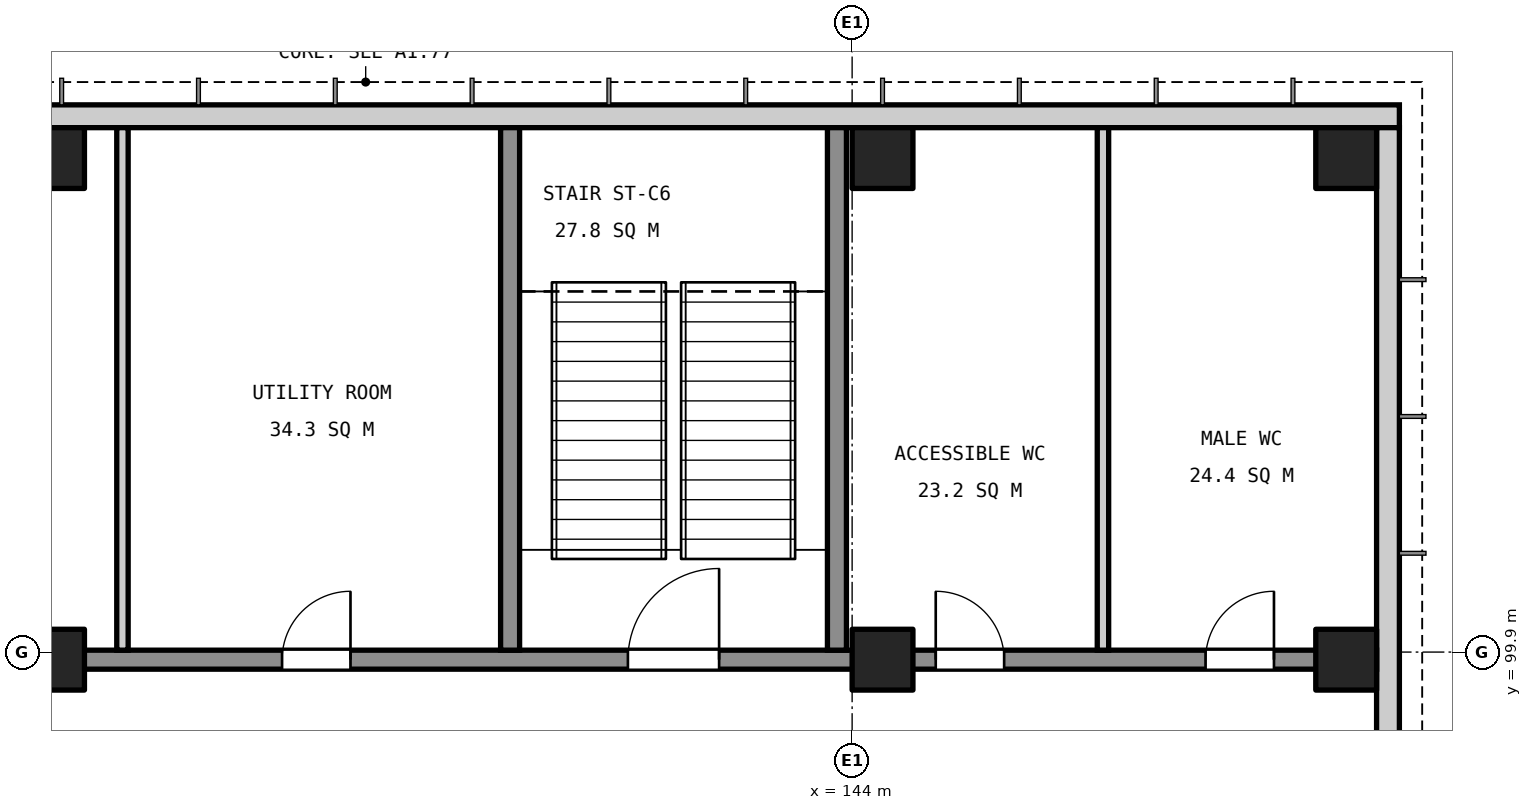
"""IFC4 building model, lengths in metres.
Left out: names, types, materials, properties, quantities, classifications, styles, units other than length and angle.
Written with IfcOpenShell. Run it as: python <this file> out.ifc"""

import sys

from ifc_helpers import new_model, si_unit, direction, frame, frame_2d, origin, origin_2d, place, context, subcontext, project, spatial, rectangle, extrude, element, fill, save


model = new_model("IFC4")
c1 = context("Model", 3, precision=1e-05, world=origin(), true_north=direction((0.0, 1.0)))
c2 = subcontext(c1, "Body", "Model", "MODEL_VIEW")
j1 = project(units=[si_unit("LENGTHUNIT", "METRE"), si_unit("PLANEANGLEUNIT", "RADIAN")], contexts=[c1])
p1 = place(None, origin())
s1 = spatial("IfcSite", under=j1, at=p1, CompositionType="ELEMENT")
p2 = place(p1, origin())
s2 = spatial("IfcBuilding", under=s1, at=p2, CompositionType="ELEMENT")
p3 = place(p2, frame((0.0, 0.0, 6.0)))
s3 = spatial("IfcBuildingStorey", under=s2, at=p3, CompositionType="ELEMENT", Elevation=6.0)
for number, where, z_axis, x_axis in (
    (1, (133.5, 99.8, 0.0), (0.0, 0.0, 1.0), (1.0, 0.0, 0.0)),
    (2, (133.5, 106.4, 0.0), (0.0, 0.0, 1.0), (1.0, 0.0, 0.0)),
    (3, (144.4, 99.8, 0.0), (0.0, 0.0, 1.0), (1.0, 0.0, 0.0)),
    (4, (144.4, 106.4, 0.0), (0.0, 0.0, 1.0), (1.0, 0.0, 0.0)),
    (5, (150.5, 99.8, 0.0), (0.0, 0.0, 1.0), (1.0, 0.0, 0.0)),
    (6, (150.5, 106.4, 0.0), (0.0, 0.0, 1.0), (1.0, 0.0, 0.0)),
):
    element("IfcColumn", number, at=place(p3, frame(where, z_axis=z_axis, x_axis=x_axis)), inside=s3, PredefinedType="COLUMN", context=c2, shape_type="SweptSolid", body=[
        extrude(rectangle(XDim=0.8, YDim=0.8, at=origin_2d()), origin(), (0.0, 0.0, 1.0), 5.4),
    ])
p4 = place(p3, frame((124.0, 106.95, 0.0), z_axis=(0.0, 0.0, 1.0), x_axis=(1.0, 0.0, 0.0)))
e7 = element("IfcWall", 7, at=p4, inside=s3, PredefinedType="SOLIDWALL", context=c2, shape_type="SweptSolid", body=[
    extrude(rectangle(XDim=27.2, YDim=0.3, at=frame_2d((13.6, 0.0))), origin(), (0.0, 0.0, 1.0), 4.95),
])
p5 = place(p3, frame((151.05, 70.3, 0.0), z_axis=(0.0, 0.0, 1.0), x_axis=(0.0, 1.0, 0.0)))
e8 = element("IfcWall", 8, at=p5, inside=s3, PredefinedType="SOLIDWALL", context=c2, shape_type="SweptSolid", body=[
    extrude(rectangle(XDim=36.5, YDim=0.3, at=frame_2d((18.25, 0.0))), origin(), (0.0, 0.0, 1.0), 4.95),
])
p6 = place(p3, frame((124.3, 99.8, 0.0), z_axis=(0.0, 0.0, 1.0), x_axis=(1.0, 0.0, 0.0)))
e9 = element("IfcWall", 9, at=p6, inside=s3, PredefinedType="SOLIDWALL", context=c2, shape_type="SweptSolid", body=[
    extrude(rectangle(XDim=26.6, YDim=0.25, at=frame_2d((13.3, 0.0))), origin(), (0.0, 0.0, 1.0), 4.95),
])
p7 = place(p6, frame((0.9, 0.0, 0.0)))
e10 = element("IfcOpeningElement", 10, at=p7, cuts=e9, PredefinedType="OPENING", context=c2, shape_type="SweptSolid", body=[
    extrude(rectangle(XDim=1.2, YDim=2.1, at=frame_2d((0.6, 1.05))), frame((0.0, 0.135, 0.0), z_axis=(0.0, -1.0, 0.0), x_axis=(1.0, 0.0, 0.0)), (0.0, 0.0, 1.0), 0.27),
])
p8 = place(p6, frame((3.9, 0.0, 0.0)))
e11 = element("IfcOpeningElement", 11, at=p8, cuts=e9, PredefinedType="OPENING", context=c2, shape_type="SweptSolid", body=[
    extrude(rectangle(XDim=1.2, YDim=2.1, at=frame_2d((0.6, 1.05))), frame((0.0, 0.135, 0.0), z_axis=(0.0, -1.0, 0.0), x_axis=(1.0, 0.0, 0.0)), (0.0, 0.0, 1.0), 0.27),
])
p9 = place(p6, frame((7.6, 0.0, 0.0)))
e12 = element("IfcOpeningElement", 12, at=p9, cuts=e9, PredefinedType="OPENING", context=c2, shape_type="SweptSolid", body=[
    extrude(rectangle(XDim=0.9, YDim=2.1, at=frame_2d((0.45, 1.05))), frame((0.0, 0.135, 0.0), z_axis=(0.0, -1.0, 0.0), x_axis=(1.0, 0.0, 0.0)), (0.0, 0.0, 1.0), 0.27),
])
p10 = place(p6, frame((20.8, 0.0, 0.0)))
e13 = element("IfcOpeningElement", 13, at=p10, cuts=e9, PredefinedType="OPENING", context=c2, shape_type="SweptSolid", body=[
    extrude(rectangle(XDim=0.9, YDim=2.1, at=frame_2d((0.45, 1.05))), frame((0.0, 0.135, 0.0), z_axis=(0.0, -1.0, 0.0), x_axis=(1.0, 0.0, 0.0)), (0.0, 0.0, 1.0), 0.27),
])
p11 = place(p6, frame((24.35, 0.0, 0.0)))
e14 = element("IfcOpeningElement", 14, at=p11, cuts=e9, PredefinedType="OPENING", context=c2, shape_type="SweptSolid", body=[
    extrude(rectangle(XDim=0.9, YDim=2.1, at=frame_2d((0.45, 1.05))), frame((0.0, 0.135, 0.0), z_axis=(0.0, -1.0, 0.0), x_axis=(1.0, 0.0, 0.0)), (0.0, 0.0, 1.0), 0.27),
])
p12 = place(p6, frame((12.2, 0.0, 0.0)))
e15 = element("IfcOpeningElement", 15, at=p12, cuts=e9, PredefinedType="OPENING", context=c2, shape_type="SweptSolid", body=[
    extrude(rectangle(XDim=0.9, YDim=2.1, at=frame_2d((0.45, 1.05))), frame((0.0, 0.135, 0.0), z_axis=(0.0, -1.0, 0.0), x_axis=(1.0, 0.0, 0.0)), (0.0, 0.0, 1.0), 0.27),
])
p13 = place(p6, frame((16.75, 0.0, 0.0)))
e16 = element("IfcOpeningElement", 16, at=p13, cuts=e9, PredefinedType="OPENING", context=c2, shape_type="SweptSolid", body=[
    extrude(rectangle(XDim=1.2, YDim=2.1, at=frame_2d((0.6, 1.05))), frame((0.0, 0.135, 0.0), z_axis=(0.0, -1.0, 0.0), x_axis=(1.0, 0.0, 0.0)), (0.0, 0.0, 1.0), 0.27),
])
p14 = place(p3, frame((134.4, 99.925, 0.0), z_axis=(0.0, 0.0, 1.0), x_axis=(0.0, 1.0, 0.0)))
e17 = element("IfcWall", 17, at=p14, inside=s3, PredefinedType="SOLIDWALL", context=c2, shape_type="SweptSolid", body=[
    extrude(rectangle(XDim=6.875, YDim=0.15, at=frame_2d((3.438, 0.0))), origin(), (0.0, 0.0, 1.0), 4.95),
])
for number, where, z_axis, x_axis in (
    (18, (139.5, 99.925, 0.0), (0.0, 0.0, 1.0), (0.0, 1.0, 0.0)),
    (19, (143.8, 99.925, 0.0), (0.0, 0.0, 1.0), (0.0, 1.0, 0.0)),
):
    element("IfcWall", number, at=place(p3, frame(where, z_axis=z_axis, x_axis=x_axis)), inside=s3, PredefinedType="SOLIDWALL", context=c2, shape_type="SweptSolid", body=[
        extrude(rectangle(XDim=6.875, YDim=0.25, at=frame_2d((3.438, 0.0))), origin(), (0.0, 0.0, 1.0), 4.95),
    ])
p15 = place(p3, frame((147.3, 99.925, 0.0), z_axis=(0.0, 0.0, 1.0), x_axis=(0.0, 1.0, 0.0)))
e20 = element("IfcWall", 20, at=p15, inside=s3, PredefinedType="SOLIDWALL", context=c2, shape_type="SweptSolid", body=[
    extrude(rectangle(XDim=6.875, YDim=0.15, at=frame_2d((3.438, 0.0))), origin(), (0.0, 0.0, 1.0), 4.95),
])
p16 = place(p10, origin())
e21 = element("IfcDoor", 21, at=p16, inside=s3, OperationType="SINGLE_SWING_LEFT", PredefinedType="DOOR", context=c2, shape_type="SweptSolid", body=[
    extrude(rectangle(XDim=0.9, YDim=2.1, at=frame_2d((0.45, 1.05))), frame((0.0, 0.025, 0.0), z_axis=(0.0, -1.0, 0.0), x_axis=(1.0, 0.0, 0.0)), (0.0, 0.0, 1.0), 0.05),
])
fill(e13, e21)
p17 = place(p11, origin())
e22 = element("IfcDoor", 22, at=p17, inside=s3, OperationType="SINGLE_SWING_RIGHT", PredefinedType="DOOR", context=c2, shape_type="SweptSolid", body=[
    extrude(rectangle(XDim=0.9, YDim=2.1, at=frame_2d((0.45, 1.05))), frame((0.0, 0.025, 0.0), z_axis=(0.0, -1.0, 0.0), x_axis=(1.0, 0.0, 0.0)), (0.0, 0.0, 1.0), 0.05),
])
fill(e14, e22)
p18 = place(p12, origin())
e23 = element("IfcDoor", 23, at=p18, inside=s3, OperationType="SINGLE_SWING_RIGHT", PredefinedType="DOOR", context=c2, shape_type="SweptSolid", body=[
    extrude(rectangle(XDim=0.9, YDim=2.1, at=frame_2d((0.45, 1.05))), frame((0.0, 0.025, 0.0), z_axis=(0.0, -1.0, 0.0), x_axis=(1.0, 0.0, 0.0)), (0.0, 0.0, 1.0), 0.05),
])
fill(e15, e23)
p19 = place(p13, origin())
e24 = element("IfcDoor", 24, at=p19, inside=s3, OperationType="SINGLE_SWING_RIGHT", PredefinedType="DOOR", context=c2, shape_type="SweptSolid", body=[
    extrude(rectangle(XDim=1.2, YDim=2.1, at=frame_2d((0.6, 1.05))), frame((0.0, 0.025, 0.0), z_axis=(0.0, -1.0, 0.0), x_axis=(1.0, 0.0, 0.0)), (0.0, 0.0, 1.0), 0.05),
])
fill(e16, e24)
save(model, sys.argv[1])
